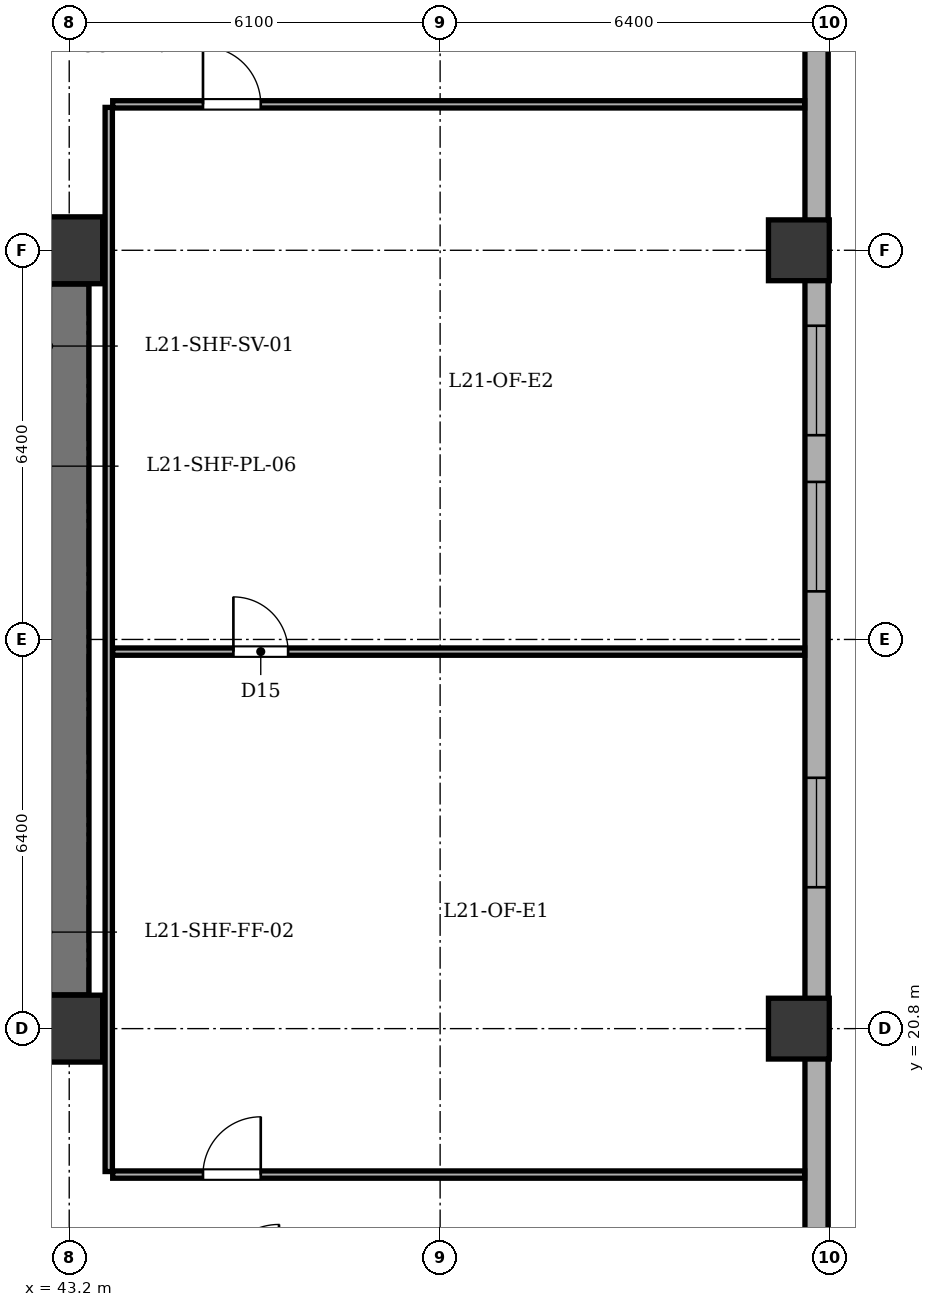
"""IFC4 building model, lengths in metres.
Left out: names, types, materials, properties, quantities, classifications, styles, units other than length and angle.
Written with IfcOpenShell. Run it as: python <this file> out.ifc"""

import sys

from ifc_helpers import new_model, si_unit, direction, frame, frame_2d, origin, origin_2d, place, context, subcontext, project, spatial, rectangle, extrude, element, fill, save


model = new_model("IFC4")
c1 = context("Model", 3, precision=1e-05, world=origin(), true_north=direction((0.0, 1.0)))
c2 = subcontext(c1, "Body", "Model", "MODEL_VIEW")
j1 = project(units=[si_unit("LENGTHUNIT", "METRE"), si_unit("PLANEANGLEUNIT", "RADIAN")], contexts=[c1])
p1 = place(None, origin())
s1 = spatial("IfcSite", under=j1, at=p1, CompositionType="ELEMENT")
p2 = place(p1, origin())
s2 = spatial("IfcBuilding", under=s1, at=p2, CompositionType="ELEMENT")
p3 = place(p2, frame((0.0, 0.0, 86.7)))
s3 = spatial("IfcBuildingStorey", under=s2, at=p3, CompositionType="ELEMENT", Elevation=86.7)
for number, where, z_axis, x_axis in (
    (1, (43.2, 20.8, 0.0), (0.0, 0.0, 1.0), (1.0, 0.0, 0.0)),
    (2, (43.2, 33.6, 0.0), (0.0, 0.0, 1.0), (1.0, 0.0, 0.0)),
):
    element("IfcColumn", number, at=place(p3, frame(where, z_axis=z_axis, x_axis=x_axis)), inside=s3, PredefinedType="COLUMN", context=c2, shape_type="SweptSolid", body=[
        extrude(rectangle(XDim=1.1, YDim=1.1, at=origin_2d()), origin(), (0.0, 0.0, 1.0), 3.9),
    ])
for number, where, z_axis, x_axis in (
    (3, (55.2, 20.8, 0.0), (0.0, 0.0, 1.0), (1.0, 0.0, 0.0)),
    (4, (55.2, 33.6, 0.0), (0.0, 0.0, 1.0), (1.0, 0.0, 0.0)),
):
    element("IfcColumn", number, at=place(p3, frame(where, z_axis=z_axis, x_axis=x_axis)), inside=s3, PredefinedType="COLUMN", context=c2, shape_type="SweptSolid", body=[
        extrude(rectangle(XDim=1.0, YDim=1.0, at=origin_2d()), origin(), (0.0, 0.0, 1.0), 3.9),
    ])
p4 = place(p3, frame((55.49, 47.9, 0.0), z_axis=(0.0, 0.0, 1.0), x_axis=(0.0, -1.0, 0.0)))
e5 = element("IfcWall", 5, at=p4, inside=s3, PredefinedType="STANDARD", context=c2, shape_type="SweptSolid", body=[
    extrude(rectangle(XDim=35.0, YDim=0.38, at=frame_2d((17.5, 0.0))), origin(), (0.0, 0.0, 1.0), 3.135),
])
p5 = place(p4, frame((2.693, 0.0, 0.8)))
e6 = element("IfcOpeningElement", 6, at=p5, cuts=e5, PredefinedType="OPENING", context=c2, shape_type="SweptSolid", body=[
    extrude(rectangle(XDim=1.8, YDim=1.9, at=frame_2d((0.9, 0.95))), frame((0.0, 0.2, 0.0), z_axis=(0.0, -1.0, 0.0), x_axis=(1.0, 0.0, 0.0)), (0.0, 0.0, 1.0), 0.4),
])
p6 = place(p4, frame((7.457, 0.0, 0.8)))
e7 = element("IfcOpeningElement", 7, at=p6, cuts=e5, PredefinedType="OPENING", context=c2, shape_type="SweptSolid", body=[
    extrude(rectangle(XDim=2.4, YDim=1.9, at=frame_2d((1.2, 0.95))), frame((0.0, 0.2, 0.0), z_axis=(0.0, -1.0, 0.0), x_axis=(1.0, 0.0, 0.0)), (0.0, 0.0, 1.0), 0.4),
])
p7 = place(p4, frame((15.541, 0.0, 0.8)))
e8 = element("IfcOpeningElement", 8, at=p7, cuts=e5, PredefinedType="OPENING", context=c2, shape_type="SweptSolid", body=[
    extrude(rectangle(XDim=1.8, YDim=1.9, at=frame_2d((0.9, 0.95))), frame((0.0, 0.2, 0.0), z_axis=(0.0, -1.0, 0.0), x_axis=(1.0, 0.0, 0.0)), (0.0, 0.0, 1.0), 0.4),
])
p8 = place(p4, frame((18.109, 0.0, 0.8)))
e9 = element("IfcOpeningElement", 9, at=p8, cuts=e5, PredefinedType="OPENING", context=c2, shape_type="SweptSolid", body=[
    extrude(rectangle(XDim=1.8, YDim=1.9, at=frame_2d((0.9, 0.95))), frame((0.0, 0.2, 0.0), z_axis=(0.0, -1.0, 0.0), x_axis=(1.0, 0.0, 0.0)), (0.0, 0.0, 1.0), 0.4),
])
p9 = place(p4, frame((22.975, 0.0, 0.8)))
e10 = element("IfcOpeningElement", 10, at=p9, cuts=e5, PredefinedType="OPENING", context=c2, shape_type="SweptSolid", body=[
    extrude(rectangle(XDim=1.8, YDim=1.9, at=frame_2d((0.9, 0.95))), frame((0.0, 0.2, 0.0), z_axis=(0.0, -1.0, 0.0), x_axis=(1.0, 0.0, 0.0)), (0.0, 0.0, 1.0), 0.4),
])
p10 = place(p4, frame((31.175, 0.0, 0.8)))
e11 = element("IfcOpeningElement", 11, at=p10, cuts=e5, PredefinedType="OPENING", context=c2, shape_type="SweptSolid", body=[
    extrude(rectangle(XDim=1.8, YDim=1.9, at=frame_2d((0.9, 0.95))), frame((0.0, 0.2, 0.0), z_axis=(0.0, -1.0, 0.0), x_axis=(1.0, 0.0, 0.0)), (0.0, 0.0, 1.0), 0.4),
])
p11 = place(p3, frame((43.2, 21.355, 0.0), z_axis=(0.0, 0.0, 1.0), x_axis=(0.0, 1.0, 0.0)))
e12 = element("IfcWall", 12, at=p11, inside=s3, PredefinedType="SHEAR", context=c2, shape_type="SweptSolid", body=[
    extrude(rectangle(XDim=11.69, YDim=0.65, at=frame_2d((5.845, 0.0))), origin(), (0.0, 0.0, 1.0), 3.6),
])
p12 = place(p3, frame((43.85, 18.45, 0.0), z_axis=(0.0, 0.0, 1.0), x_axis=(0.0, 1.0, 0.0)))
e13 = element("IfcWall", 13, at=p12, inside=s3, PredefinedType="PARTITIONING", context=c2, shape_type="SweptSolid", body=[
    extrude(rectangle(XDim=17.5, YDim=0.12, at=frame_2d((8.75, 0.0))), origin(), (0.0, 0.0, 1.0), 3.6),
])
p13 = place(p3, frame((43.915, 18.4, 0.0), z_axis=(0.0, 0.0, 1.0), x_axis=(1.0, 0.0, 0.0)))
e14 = element("IfcWall", 14, at=p13, inside=s3, PredefinedType="PARTITIONING", context=c2, shape_type="SweptSolid", body=[
    extrude(rectangle(XDim=11.38, YDim=0.12, at=frame_2d((5.69, 0.0))), origin(), (0.0, 0.0, 1.0), 3.6),
])
p14 = place(p13, frame((1.485, 0.0, 0.0)))
e15 = element("IfcOpeningElement", 15, at=p14, cuts=e14, PredefinedType="OPENING", context=c2, shape_type="SweptSolid", body=[
    extrude(rectangle(XDim=0.95, YDim=2.1, at=frame_2d((0.475, 1.05))), frame((0.0, 0.07, 0.0), z_axis=(0.0, -1.0, 0.0), x_axis=(1.0, 0.0, 0.0)), (0.0, 0.0, 1.0), 0.14),
])
p15 = place(p3, frame((43.915, 36.0, 0.0), z_axis=(0.0, 0.0, 1.0), x_axis=(1.0, 0.0, 0.0)))
e16 = element("IfcWall", 16, at=p15, inside=s3, PredefinedType="PARTITIONING", context=c2, shape_type="SweptSolid", body=[
    extrude(rectangle(XDim=11.38, YDim=0.12, at=frame_2d((5.69, 0.0))), origin(), (0.0, 0.0, 1.0), 3.6),
])
p16 = place(p15, frame((1.485, 0.0, 0.0)))
e17 = element("IfcOpeningElement", 17, at=p16, cuts=e16, PredefinedType="OPENING", context=c2, shape_type="SweptSolid", body=[
    extrude(rectangle(XDim=0.95, YDim=2.1, at=frame_2d((0.475, 1.05))), frame((0.0, 0.07, 0.0), z_axis=(0.0, -1.0, 0.0), x_axis=(1.0, 0.0, 0.0)), (0.0, 0.0, 1.0), 0.14),
])
p17 = place(p3, frame((43.915, 27.0, 0.0), z_axis=(0.0, 0.0, 1.0), x_axis=(1.0, 0.0, 0.0)))
e18 = element("IfcWall", 18, at=p17, inside=s3, PredefinedType="PARTITIONING", context=c2, shape_type="SweptSolid", body=[
    extrude(rectangle(XDim=11.38, YDim=0.12, at=frame_2d((5.69, 0.0))), origin(), (0.0, 0.0, 1.0), 3.6),
])
p18 = place(p17, frame((1.985, 0.0, 0.0)))
e19 = element("IfcOpeningElement", 19, at=p18, cuts=e18, PredefinedType="OPENING", context=c2, shape_type="SweptSolid", body=[
    extrude(rectangle(XDim=0.9, YDim=2.05, at=frame_2d((0.45, 1.025))), frame((0.0, 0.07, 0.0), z_axis=(0.0, -1.0, 0.0), x_axis=(1.0, 0.0, 0.0)), (0.0, 0.0, 1.0), 0.14),
])
p19 = place(p7, origin())
e20 = element("IfcWindow", 20, at=p19, inside=s3, PartitioningType="SINGLE_PANEL", PredefinedType="WINDOW", context=c2, shape_type="SweptSolid", body=[
    extrude(rectangle(XDim=1.8, YDim=1.9, at=frame_2d((0.9, 0.95))), frame((0.0, -0.01, 0.0), z_axis=(0.0, -1.0, 0.0), x_axis=(1.0, 0.0, 0.0)), (0.0, 0.0, 1.0), 0.06),
])
fill(e8, e20)
p20 = place(p8, origin())
e21 = element("IfcWindow", 21, at=p20, inside=s3, PartitioningType="SINGLE_PANEL", PredefinedType="WINDOW", context=c2, shape_type="SweptSolid", body=[
    extrude(rectangle(XDim=1.8, YDim=1.9, at=frame_2d((0.9, 0.95))), frame((0.0, -0.01, 0.0), z_axis=(0.0, -1.0, 0.0), x_axis=(1.0, 0.0, 0.0)), (0.0, 0.0, 1.0), 0.06),
])
fill(e9, e21)
p21 = place(p9, origin())
e22 = element("IfcWindow", 22, at=p21, inside=s3, PartitioningType="SINGLE_PANEL", PredefinedType="WINDOW", context=c2, shape_type="SweptSolid", body=[
    extrude(rectangle(XDim=1.8, YDim=1.9, at=frame_2d((0.9, 0.95))), frame((0.0, -0.01, 0.0), z_axis=(0.0, -1.0, 0.0), x_axis=(1.0, 0.0, 0.0)), (0.0, 0.0, 1.0), 0.06),
])
fill(e10, e22)
p22 = place(p18, origin())
e23 = element("IfcDoor", 23, at=p22, inside=s3, OperationType="SINGLE_SWING_LEFT", PredefinedType="DOOR", context=c2, shape_type="SweptSolid", body=[
    extrude(rectangle(XDim=0.9, YDim=2.05, at=frame_2d((0.45, 1.025))), frame((0.0, 0.025, 0.0), z_axis=(0.0, -1.0, 0.0), x_axis=(1.0, 0.0, 0.0)), (0.0, 0.0, 1.0), 0.05),
])
fill(e19, e23)
p23 = place(p14, origin())
e24 = element("IfcDoor", 24, at=p23, inside=s3, OperationType="SINGLE_SWING_RIGHT", PredefinedType="DOOR", context=c2, shape_type="SweptSolid", body=[
    extrude(rectangle(XDim=0.95, YDim=2.1, at=frame_2d((0.475, 1.05))), frame((0.0, 0.025, 0.0), z_axis=(0.0, -1.0, 0.0), x_axis=(1.0, 0.0, 0.0)), (0.0, 0.0, 1.0), 0.05),
])
fill(e15, e24)
p24 = place(p16, origin())
e25 = element("IfcDoor", 25, at=p24, inside=s3, OperationType="SINGLE_SWING_LEFT", PredefinedType="DOOR", context=c2, shape_type="SweptSolid", body=[
    extrude(rectangle(XDim=0.95, YDim=2.1, at=frame_2d((0.475, 1.05))), frame((0.0, 0.025, 0.0), z_axis=(0.0, -1.0, 0.0), x_axis=(1.0, 0.0, 0.0)), (0.0, 0.0, 1.0), 0.05),
])
fill(e17, e25)
save(model, sys.argv[1])
